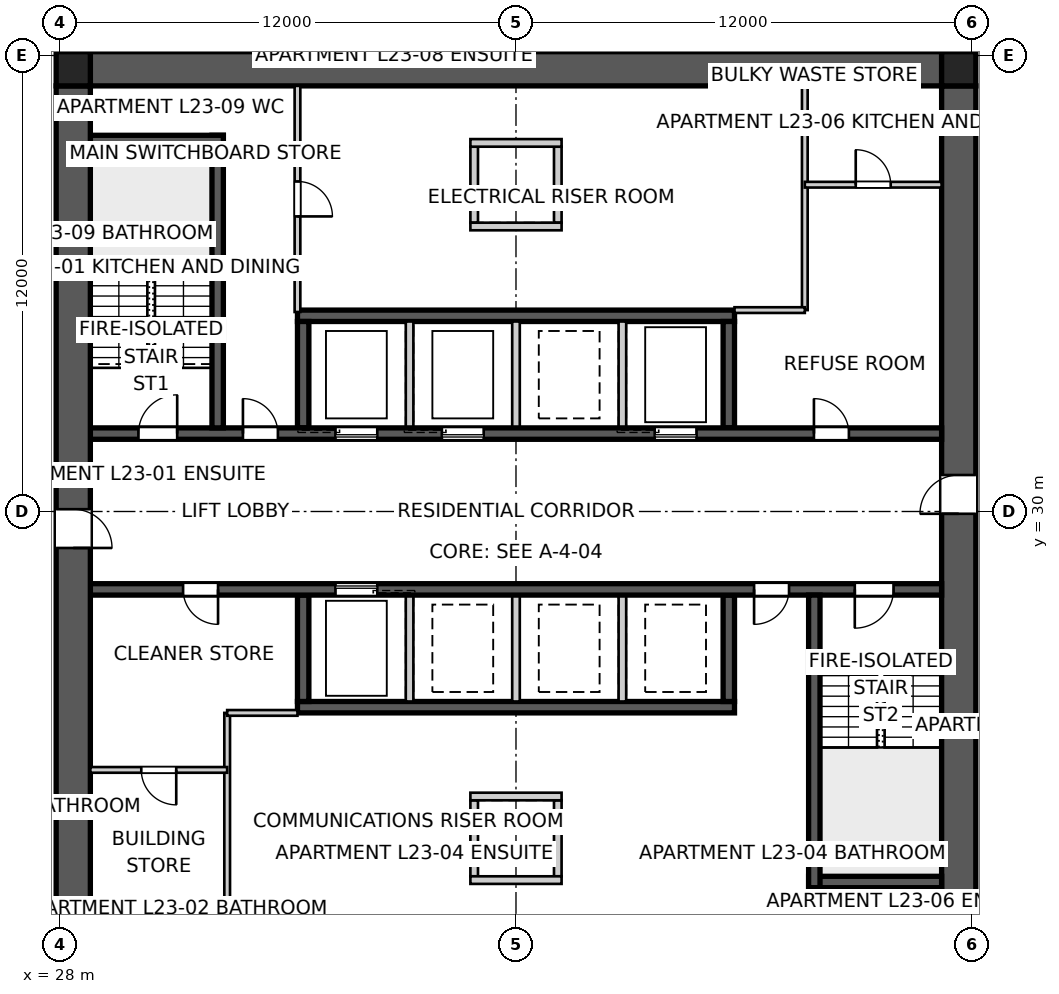
"""IFC4 building model, lengths in metres.
Left out: names, types, materials, properties, quantities, classifications, styles, units other than length and angle.
Written with IfcOpenShell. Run it as: python <this file> out.ifc"""

import sys

from ifc_helpers import new_model, si_unit, direction, frame, frame_2d, origin, origin_2d, place, context, subcontext, project, spatial, polyline, rectangle, outline, extrude, element, fill, save


model = new_model("IFC4")
c1 = context("Model", 3, precision=1e-05, world=origin(), true_north=direction((0.0, 1.0)))
c2 = subcontext(c1, "Body", "Model", "MODEL_VIEW")
j1 = project(units=[si_unit("LENGTHUNIT", "METRE"), si_unit("PLANEANGLEUNIT", "RADIAN")], contexts=[c1])
p1 = place(None, origin())
s1 = spatial("IfcSite", under=j1, at=p1, CompositionType="ELEMENT")
p2 = place(p1, origin())
s2 = spatial("IfcBuilding", under=s1, at=p2, CompositionType="ELEMENT")
p3 = place(p2, frame((0.0, 0.0, 86.2)))
s3 = spatial("IfcBuildingStorey", under=s2, at=p3, CompositionType="ELEMENT", Elevation=86.2)
p4 = place(p3, frame((28.8, 41.65, 0.0), z_axis=(0.0, 0.0, 1.0), x_axis=(1.0, 0.0, 0.0)))
e1 = element("IfcWall", 1, at=p4, inside=s3, PredefinedType="SHEAR", context=c2, shape_type="SweptSolid", body=[
    extrude(outline(polyline([(0.0, -0.45), (22.4, -0.45), (22.4, -0.025), (22.85, -0.025), (22.85, 0.025), (22.4, 0.025), (22.4, 0.45), (0.0, 0.45), (0.0, 0.025), (-0.45, 0.025), (-0.45, -0.025), (0.0, -0.025), (0.0, -0.45)])), origin(), (0.0, 0.0, 1.0), 3.4),
])
p5 = place(p3, frame((51.65, 18.8, 0.0), z_axis=(0.0, 0.0, 1.0), x_axis=(0.0, 1.0, 0.0)))
e2 = element("IfcWall", 2, at=p5, inside=s3, PredefinedType="SHEAR", context=c2, shape_type="SweptSolid", body=[
    extrude(outline(polyline([(0.0, -0.45), (22.4, -0.45), (22.4, -0.025), (22.85, -0.025), (22.85, 0.025), (22.4, 0.025), (22.4, 0.45), (0.0, 0.45), (0.0, 0.025), (-0.45, 0.025), (-0.45, -0.025), (0.0, -0.025), (0.0, -0.45)])), origin(), (0.0, 0.0, 1.0), 3.4),
])
p6 = place(p5, frame((11.14, 0.0, 0.0)))
e3 = element("IfcOpeningElement", 3, at=p6, cuts=e2, PredefinedType="OPENING", context=c2, shape_type="SweptSolid", body=[
    extrude(rectangle(XDim=1.02, YDim=2.4, at=frame_2d((0.51, 1.2))), frame((0.0, 0.46, 0.0), z_axis=(0.0, -1.0, 0.0), x_axis=(1.0, 0.0, 0.0)), (0.0, 0.0, 1.0), 0.92),
])
p7 = place(p3, frame((28.35, 41.2, 0.0), z_axis=(0.0, 0.0, 1.0), x_axis=(0.0, -1.0, 0.0)))
e4 = element("IfcWall", 4, at=p7, inside=s3, PredefinedType="SHEAR", context=c2, shape_type="SweptSolid", body=[
    extrude(outline(polyline([(0.0, -0.45), (22.4, -0.45), (22.4, -0.025), (22.85, -0.025), (22.85, 0.025), (22.4, 0.025), (22.4, 0.45), (0.0, 0.45), (0.0, 0.025), (-0.45, 0.025), (-0.45, -0.025), (0.0, -0.025), (0.0, -0.45)])), origin(), (0.0, 0.0, 1.0), 3.4),
])
p8 = place(p7, frame((11.14, 0.0, 0.0)))
e5 = element("IfcOpeningElement", 5, at=p8, cuts=e4, PredefinedType="OPENING", context=c2, shape_type="SweptSolid", body=[
    extrude(rectangle(XDim=1.02, YDim=2.4, at=frame_2d((0.51, 1.2))), frame((0.0, 0.46, 0.0), z_axis=(0.0, -1.0, 0.0), x_axis=(1.0, 0.0, 0.0)), (0.0, 0.0, 1.0), 0.92),
])
p9 = place(p3, frame((28.8, 32.05, 0.0), z_axis=(0.0, 0.0, 1.0), x_axis=(1.0, 0.0, 0.0)))
e6 = element("IfcWall", 6, at=p9, inside=s3, PredefinedType="SHEAR", context=c2, shape_type="SweptSolid", body=[
    extrude(rectangle(XDim=22.4, YDim=0.3, at=frame_2d((11.2, 0.0))), origin(), (0.0, 0.0, 1.0), 3.4),
])
p10 = place(p9, frame((19.04, 0.0, 0.0)))
e7 = element("IfcOpeningElement", 7, at=p10, cuts=e6, PredefinedType="OPENING", context=c2, shape_type="SweptSolid", body=[
    extrude(rectangle(XDim=0.92, YDim=2.1, at=frame_2d((0.46, 1.05))), frame((0.0, 0.16, 0.0), z_axis=(0.0, -1.0, 0.0), x_axis=(1.0, 0.0, 0.0)), (0.0, 0.0, 1.0), 0.32),
])
p11 = place(p9, frame((1.265, 0.0, 0.0)))
e8 = element("IfcOpeningElement", 8, at=p11, cuts=e6, PredefinedType="OPENING", context=c2, shape_type="SweptSolid", body=[
    extrude(rectangle(XDim=1.02, YDim=2.1, at=frame_2d((0.51, 1.05))), frame((0.0, 0.16, 0.0), z_axis=(0.0, -1.0, 0.0), x_axis=(1.0, 0.0, 0.0)), (0.0, 0.0, 1.0), 0.32),
])
p12 = place(p9, frame((4.015, 0.0, 0.0)))
e9 = element("IfcOpeningElement", 9, at=p12, cuts=e6, PredefinedType="OPENING", context=c2, shape_type="SweptSolid", body=[
    extrude(rectangle(XDim=0.92, YDim=2.1, at=frame_2d((0.46, 1.05))), frame((0.0, 0.16, 0.0), z_axis=(0.0, -1.0, 0.0), x_axis=(1.0, 0.0, 0.0)), (0.0, 0.0, 1.0), 0.32),
])
p13 = place(p9, frame((6.45, 0.0, 0.0)))
e10 = element("IfcOpeningElement", 10, at=p13, cuts=e6, PredefinedType="OPENING", context=c2, shape_type="SweptSolid", body=[
    extrude(rectangle(XDim=1.1, YDim=2.1, at=frame_2d((0.55, 1.05))), frame((0.0, 0.16, 0.0), z_axis=(0.0, -1.0, 0.0), x_axis=(1.0, 0.0, 0.0)), (0.0, 0.0, 1.0), 0.32),
])
p14 = place(p9, frame((9.25, 0.0, 0.0)))
e11 = element("IfcOpeningElement", 11, at=p14, cuts=e6, PredefinedType="OPENING", context=c2, shape_type="SweptSolid", body=[
    extrude(rectangle(XDim=1.1, YDim=2.1, at=frame_2d((0.55, 1.05))), frame((0.0, 0.16, 0.0), z_axis=(0.0, -1.0, 0.0), x_axis=(1.0, 0.0, 0.0)), (0.0, 0.0, 1.0), 0.32),
])
p15 = place(p9, frame((14.85, 0.0, 0.0)))
e12 = element("IfcOpeningElement", 12, at=p15, cuts=e6, PredefinedType="OPENING", context=c2, shape_type="SweptSolid", body=[
    extrude(rectangle(XDim=1.1, YDim=2.1, at=frame_2d((0.55, 1.05))), frame((0.0, 0.16, 0.0), z_axis=(0.0, -1.0, 0.0), x_axis=(1.0, 0.0, 0.0)), (0.0, 0.0, 1.0), 0.32),
])
p16 = place(p3, frame((51.2, 27.95, 0.0), z_axis=(0.0, 0.0, 1.0), x_axis=(-1.0, 0.0, 0.0)))
e13 = element("IfcWall", 13, at=p16, inside=s3, PredefinedType="SHEAR", context=c2, shape_type="SweptSolid", body=[
    extrude(rectangle(XDim=22.4, YDim=0.3, at=frame_2d((11.2, 0.0))), origin(), (0.0, 0.0, 1.0), 3.4),
])
p17 = place(p16, frame((19.04, 0.0, 0.0)))
e14 = element("IfcOpeningElement", 14, at=p17, cuts=e13, PredefinedType="OPENING", context=c2, shape_type="SweptSolid", body=[
    extrude(rectangle(XDim=0.92, YDim=2.1, at=frame_2d((0.46, 1.05))), frame((0.0, 0.16, 0.0), z_axis=(0.0, -1.0, 0.0), x_axis=(1.0, 0.0, 0.0)), (0.0, 0.0, 1.0), 0.32),
])
p18 = place(p16, frame((1.265, 0.0, 0.0)))
e15 = element("IfcOpeningElement", 15, at=p18, cuts=e13, PredefinedType="OPENING", context=c2, shape_type="SweptSolid", body=[
    extrude(rectangle(XDim=1.02, YDim=2.1, at=frame_2d((0.51, 1.05))), frame((0.0, 0.16, 0.0), z_axis=(0.0, -1.0, 0.0), x_axis=(1.0, 0.0, 0.0)), (0.0, 0.0, 1.0), 0.32),
])
p19 = place(p16, frame((4.015, 0.0, 0.0)))
e16 = element("IfcOpeningElement", 16, at=p19, cuts=e13, PredefinedType="OPENING", context=c2, shape_type="SweptSolid", body=[
    extrude(rectangle(XDim=0.92, YDim=2.1, at=frame_2d((0.46, 1.05))), frame((0.0, 0.16, 0.0), z_axis=(0.0, -1.0, 0.0), x_axis=(1.0, 0.0, 0.0)), (0.0, 0.0, 1.0), 0.32),
])
p20 = place(p16, frame((14.85, 0.0, 0.0)))
e17 = element("IfcOpeningElement", 17, at=p20, cuts=e13, PredefinedType="OPENING", context=c2, shape_type="SweptSolid", body=[
    extrude(rectangle(XDim=1.1, YDim=2.1, at=frame_2d((0.55, 1.05))), frame((0.0, 0.16, 0.0), z_axis=(0.0, -1.0, 0.0), x_axis=(1.0, 0.0, 0.0)), (0.0, 0.0, 1.0), 0.32),
])
for number, where, z_axis, x_axis in (
    (18, (34.25, 35.15, 0.0), (0.0, 0.0, 1.0), (1.0, 0.0, 0.0)),
    (19, (45.75, 24.85, 0.0), (0.0, 0.0, 1.0), (-1.0, 0.0, 0.0)),
):
    element("IfcWall", number, at=place(p3, frame(where, z_axis=z_axis, x_axis=x_axis)), inside=s3, PredefinedType="SHEAR", context=c2, shape_type="SweptSolid", body=[
        extrude(rectangle(XDim=11.5, YDim=0.3, at=frame_2d((5.75, 0.0))), origin(), (0.0, 0.0, 1.0), 3.4),
    ])
for number, where, z_axis, x_axis in (
    (20, (34.4, 32.2, 0.0), (0.0, 0.0, 1.0), (0.0, 1.0, 0.0)),
    (21, (45.6, 27.8, 0.0), (0.0, 0.0, 1.0), (0.0, -1.0, 0.0)),
):
    element("IfcWall", number, at=place(p3, frame(where, z_axis=z_axis, x_axis=x_axis)), inside=s3, PredefinedType="SHEAR", context=c2, shape_type="SweptSolid", body=[
        extrude(rectangle(XDim=2.8, YDim=0.3, at=frame_2d((1.4, 0.0))), origin(), (0.0, 0.0, 1.0), 3.4),
    ])
for number, where, z_axis, x_axis in (
    (22, (37.2, 32.2, 0.0), (0.0, 0.0, 1.0), (0.0, 1.0, 0.0)),
    (23, (42.8, 27.8, 0.0), (0.0, 0.0, 1.0), (0.0, -1.0, 0.0)),
    (24, (40.0, 32.2, 0.0), (0.0, 0.0, 1.0), (0.0, 1.0, 0.0)),
    (25, (40.0, 27.8, 0.0), (0.0, 0.0, 1.0), (0.0, -1.0, 0.0)),
    (26, (42.8, 32.2, 0.0), (0.0, 0.0, 1.0), (0.0, 1.0, 0.0)),
    (27, (37.2, 27.8, 0.0), (0.0, 0.0, 1.0), (0.0, -1.0, 0.0)),
):
    element("IfcWall", number, at=place(p3, frame(where, z_axis=z_axis, x_axis=x_axis)), inside=s3, PredefinedType="SOLIDWALL", context=c2, shape_type="SweptSolid", body=[
        extrude(rectangle(XDim=2.8, YDim=0.2, at=frame_2d((1.4, 0.0))), origin(), (0.0, 0.0, 1.0), 3.4),
    ])
for number, where, z_axis, x_axis in (
    (28, (45.6, 32.2, 0.0), (0.0, 0.0, 1.0), (0.0, 1.0, 0.0)),
    (29, (34.4, 27.8, 0.0), (0.0, 0.0, 1.0), (0.0, -1.0, 0.0)),
):
    element("IfcWall", number, at=place(p3, frame(where, z_axis=z_axis, x_axis=x_axis)), inside=s3, PredefinedType="SHEAR", context=c2, shape_type="SweptSolid", body=[
        extrude(rectangle(XDim=2.8, YDim=0.3, at=frame_2d((1.4, 0.0))), origin(), (0.0, 0.0, 1.0), 3.4),
    ])
p21 = place(p3, frame((32.15, 32.2, 0.0), z_axis=(0.0, 0.0, 1.0), x_axis=(0.0, 1.0, 0.0)))
e30 = element("IfcWall", 30, at=p21, inside=s3, PredefinedType="SHEAR", context=c2, shape_type="SweptSolid", body=[
    extrude(rectangle(XDim=7.7, YDim=0.3, at=frame_2d((3.85, 0.0))), origin(), (0.0, 0.0, 1.0), 3.4),
])
p22 = place(p3, frame((28.8, 39.75, 0.0), z_axis=(0.0, 0.0, 1.0), x_axis=(1.0, 0.0, 0.0)))
e31 = element("IfcWall", 31, at=p22, inside=s3, PredefinedType="SHEAR", context=c2, shape_type="SweptSolid", body=[
    extrude(rectangle(XDim=3.5, YDim=0.3, at=frame_2d((1.75, 0.0))), origin(), (0.0, 0.0, 1.0), 3.4),
])
p23 = place(p3, frame((47.85, 27.8, 0.0), z_axis=(0.0, 0.0, 1.0), x_axis=(0.0, -1.0, 0.0)))
e32 = element("IfcWall", 32, at=p23, inside=s3, PredefinedType="SHEAR", context=c2, shape_type="SweptSolid", body=[
    extrude(rectangle(XDim=7.7, YDim=0.3, at=frame_2d((3.85, 0.0))), origin(), (0.0, 0.0, 1.0), 3.4),
])
p24 = place(p3, frame((51.2, 20.25, 0.0), z_axis=(0.0, 0.0, 1.0), x_axis=(-1.0, 0.0, 0.0)))
e33 = element("IfcWall", 33, at=p24, inside=s3, PredefinedType="SHEAR", context=c2, shape_type="SweptSolid", body=[
    extrude(rectangle(XDim=3.5, YDim=0.3, at=frame_2d((1.75, 0.0))), origin(), (0.0, 0.0, 1.0), 3.4),
])
for number, where, z_axis, x_axis in (
    (34, (38.9, 37.6, 0.0), (0.0, 0.0, 1.0), (0.0, 1.0, 0.0)),
    (35, (41.1, 37.6, 0.0), (0.0, 0.0, 1.0), (0.0, 1.0, 0.0)),
):
    element("IfcWall", number, at=place(p3, frame(where, z_axis=z_axis, x_axis=x_axis)), inside=s3, PredefinedType="SOLIDWALL", context=c2, shape_type="SweptSolid", body=[
        extrude(rectangle(XDim=2.0, YDim=0.2, at=frame_2d((1.0, 0.0))), origin(), (0.0, 0.0, 1.0), 3.4),
    ])
for number, where, z_axis, x_axis in (
    (36, (38.8, 37.5, 0.0), (0.0, 0.0, 1.0), (1.0, 0.0, 0.0)),
    (37, (38.8, 39.7, 0.0), (0.0, 0.0, 1.0), (1.0, 0.0, 0.0)),
):
    element("IfcWall", number, at=place(p3, frame(where, z_axis=z_axis, x_axis=x_axis)), inside=s3, PredefinedType="SOLIDWALL", context=c2, shape_type="SweptSolid", body=[
        extrude(rectangle(XDim=2.4, YDim=0.2, at=frame_2d((1.2, 0.0))), origin(), (0.0, 0.0, 1.0), 3.4),
    ])
for number, where, z_axis, x_axis in (
    (38, (38.9, 22.4, 0.0), (0.0, 0.0, 1.0), (0.0, -1.0, 0.0)),
    (39, (41.1, 22.4, 0.0), (0.0, 0.0, 1.0), (0.0, -1.0, 0.0)),
):
    element("IfcWall", number, at=place(p3, frame(where, z_axis=z_axis, x_axis=x_axis)), inside=s3, PredefinedType="SOLIDWALL", context=c2, shape_type="SweptSolid", body=[
        extrude(rectangle(XDim=2.0, YDim=0.2, at=frame_2d((1.0, 0.0))), origin(), (0.0, 0.0, 1.0), 3.4),
    ])
for number, where, z_axis, x_axis in (
    (40, (38.8, 22.5, 0.0), (0.0, 0.0, 1.0), (1.0, 0.0, 0.0)),
    (41, (38.8, 20.3, 0.0), (0.0, 0.0, 1.0), (1.0, 0.0, 0.0)),
):
    element("IfcWall", number, at=place(p3, frame(where, z_axis=z_axis, x_axis=x_axis)), inside=s3, PredefinedType="SOLIDWALL", context=c2, shape_type="SweptSolid", body=[
        extrude(rectangle(XDim=2.4, YDim=0.2, at=frame_2d((1.2, 0.0))), origin(), (0.0, 0.0, 1.0), 3.4),
    ])
for number, where, z_axis, x_axis in (
    (42, (51.65, 41.65, 0.0), (0.0, 0.0, 1.0), (1.0, 0.0, 0.0)),
    (43, (28.35, 41.65, 0.0), (0.0, 0.0, 1.0), (1.0, 0.0, 0.0)),
):
    element("IfcColumn", number, at=place(p3, frame(where, z_axis=z_axis, x_axis=x_axis)), inside=s3, PredefinedType="COLUMN", context=c2, shape_type="SweptSolid", body=[
        extrude(rectangle(XDim=0.9, YDim=0.9, at=origin_2d()), origin(), (0.0, 0.0, 1.0), 3.4),
    ])
p25 = place(p3, frame((34.25, 41.2, 0.0), z_axis=(0.0, 0.0, 1.0), x_axis=(0.0, -1.0, 0.0)))
e44 = element("IfcWall", 44, at=p25, inside=s3, PredefinedType="SOLIDWALL", context=c2, shape_type="SweptSolid", body=[
    extrude(rectangle(XDim=5.95, YDim=0.15, at=frame_2d((2.975, 0.0))), origin(), (0.0, 0.0, 1.0), 3.25),
])
p26 = place(p25, frame((2.515, 0.0, 0.0)))
e45 = element("IfcOpeningElement", 45, at=p26, cuts=e44, PredefinedType="OPENING", context=c2, shape_type="SweptSolid", body=[
    extrude(rectangle(XDim=0.92, YDim=2.1, at=frame_2d((0.46, 1.05))), frame((0.0, 0.085, 0.0), z_axis=(0.0, -1.0, 0.0), x_axis=(1.0, 0.0, 0.0)), (0.0, 0.0, 1.0), 0.17),
])
p27 = place(p3, frame((47.6, 41.2, 0.0), z_axis=(0.0, 0.0, 1.0), x_axis=(0.0, -1.0, 0.0)))
e46 = element("IfcWall", 46, at=p27, inside=s3, PredefinedType="SOLIDWALL", context=c2, shape_type="SweptSolid", body=[
    extrude(rectangle(XDim=5.9, YDim=0.15, at=frame_2d((2.95, 0.0))), origin(), (0.0, 0.0, 1.0), 3.25),
])
p28 = place(p3, frame((47.6, 35.3, 0.0), z_axis=(0.0, 0.0, 1.0), x_axis=(-1.0, 0.0, 0.0)))
e47 = element("IfcWall", 47, at=p28, inside=s3, PredefinedType="SOLIDWALL", context=c2, shape_type="SweptSolid", body=[
    extrude(rectangle(XDim=1.85, YDim=0.15, at=frame_2d((0.925, 0.0))), origin(), (0.0, 0.0, 1.0), 3.25),
])
p29 = place(p3, frame((47.6, 38.6, 0.0), z_axis=(0.0, 0.0, 1.0), x_axis=(1.0, 0.0, 0.0)))
e48 = element("IfcWall", 48, at=p29, inside=s3, PredefinedType="SOLIDWALL", context=c2, shape_type="SweptSolid", body=[
    extrude(rectangle(XDim=3.6, YDim=0.15, at=frame_2d((1.8, 0.0))), origin(), (0.0, 0.0, 1.0), 3.25),
])
p30 = place(p29, frame((1.34, 0.0, 0.0)))
e49 = element("IfcOpeningElement", 49, at=p30, cuts=e48, PredefinedType="OPENING", context=c2, shape_type="SweptSolid", body=[
    extrude(rectangle(XDim=0.92, YDim=2.1, at=frame_2d((0.46, 1.05))), frame((0.0, 0.085, 0.0), z_axis=(0.0, -1.0, 0.0), x_axis=(1.0, 0.0, 0.0)), (0.0, 0.0, 1.0), 0.17),
])
p31 = place(p3, frame((32.4, 18.8, 0.0), z_axis=(0.0, 0.0, 1.0), x_axis=(0.0, 1.0, 0.0)))
e50 = element("IfcWall", 50, at=p31, inside=s3, PredefinedType="SOLIDWALL", context=c2, shape_type="SweptSolid", body=[
    extrude(rectangle(XDim=5.9, YDim=0.15, at=frame_2d((2.95, 0.0))), origin(), (0.0, 0.0, 1.0), 3.25),
])
p32 = place(p3, frame((32.4, 24.7, 0.0), z_axis=(0.0, 0.0, 1.0), x_axis=(1.0, 0.0, 0.0)))
e51 = element("IfcWall", 51, at=p32, inside=s3, PredefinedType="SOLIDWALL", context=c2, shape_type="SweptSolid", body=[
    extrude(rectangle(XDim=1.85, YDim=0.15, at=frame_2d((0.925, 0.0))), origin(), (0.0, 0.0, 1.0), 3.25),
])
p33 = place(p3, frame((32.4, 23.2, 0.0), z_axis=(0.0, 0.0, 1.0), x_axis=(-1.0, 0.0, 0.0)))
e52 = element("IfcWall", 52, at=p33, inside=s3, PredefinedType="SOLIDWALL", context=c2, shape_type="SweptSolid", body=[
    extrude(rectangle(XDim=3.6, YDim=0.15, at=frame_2d((1.8, 0.0))), origin(), (0.0, 0.0, 1.0), 3.25),
])
p34 = place(p33, frame((1.34, 0.0, 0.0)))
e53 = element("IfcOpeningElement", 53, at=p34, cuts=e52, PredefinedType="OPENING", context=c2, shape_type="SweptSolid", body=[
    extrude(rectangle(XDim=0.92, YDim=2.1, at=frame_2d((0.46, 1.05))), frame((0.0, 0.085, 0.0), z_axis=(0.0, -1.0, 0.0), x_axis=(1.0, 0.0, 0.0)), (0.0, 0.0, 1.0), 0.17),
])
p35 = place(p10, origin())
e54 = element("IfcDoor", 54, at=p35, inside=s3, OperationType="SINGLE_SWING_LEFT", PredefinedType="DOOR", context=c2, shape_type="SweptSolid", body=[
    extrude(rectangle(XDim=0.92, YDim=2.1, at=frame_2d((0.46, 1.05))), frame((0.0, 0.025, 0.0), z_axis=(0.0, -1.0, 0.0), x_axis=(1.0, 0.0, 0.0)), (0.0, 0.0, 1.0), 0.05),
])
fill(e7, e54)
p36 = place(p17, origin())
e55 = element("IfcDoor", 55, at=p36, inside=s3, OperationType="SINGLE_SWING_LEFT", PredefinedType="DOOR", context=c2, shape_type="SweptSolid", body=[
    extrude(rectangle(XDim=0.92, YDim=2.1, at=frame_2d((0.46, 1.05))), frame((0.0, 0.025, 0.0), z_axis=(0.0, -1.0, 0.0), x_axis=(1.0, 0.0, 0.0)), (0.0, 0.0, 1.0), 0.05),
])
fill(e14, e55)
p37 = place(p18, origin())
e56 = element("IfcDoor", 56, at=p37, inside=s3, OperationType="SINGLE_SWING_RIGHT", PredefinedType="DOOR", context=c2, shape_type="SweptSolid", body=[
    extrude(rectangle(XDim=1.02, YDim=2.1, at=frame_2d((0.51, 1.05))), frame((0.0, 0.025, 0.0), z_axis=(0.0, -1.0, 0.0), x_axis=(1.0, 0.0, 0.0)), (0.0, 0.0, 1.0), 0.05),
])
fill(e15, e56)
p38 = place(p11, origin())
e57 = element("IfcDoor", 57, at=p38, inside=s3, OperationType="SINGLE_SWING_RIGHT", PredefinedType="DOOR", context=c2, shape_type="SweptSolid", body=[
    extrude(rectangle(XDim=1.02, YDim=2.1, at=frame_2d((0.51, 1.05))), frame((0.0, 0.025, 0.0), z_axis=(0.0, -1.0, 0.0), x_axis=(1.0, 0.0, 0.0)), (0.0, 0.0, 1.0), 0.05),
])
fill(e8, e57)
p39 = place(p12, origin())
e58 = element("IfcDoor", 58, at=p39, inside=s3, OperationType="SINGLE_SWING_LEFT", PredefinedType="DOOR", context=c2, shape_type="SweptSolid", body=[
    extrude(rectangle(XDim=0.92, YDim=2.1, at=frame_2d((0.46, 1.05))), frame((0.0, 0.025, 0.0), z_axis=(0.0, -1.0, 0.0), x_axis=(1.0, 0.0, 0.0)), (0.0, 0.0, 1.0), 0.05),
])
fill(e9, e58)
p40 = place(p19, origin())
e59 = element("IfcDoor", 59, at=p40, inside=s3, OperationType="SINGLE_SWING_RIGHT", PredefinedType="DOOR", context=c2, shape_type="SweptSolid", body=[
    extrude(rectangle(XDim=0.92, YDim=2.1, at=frame_2d((0.46, 1.05))), frame((0.0, 0.025, 0.0), z_axis=(0.0, -1.0, 0.0), x_axis=(1.0, 0.0, 0.0)), (0.0, 0.0, 1.0), 0.05),
])
fill(e16, e59)
p41 = place(p30, origin())
e60 = element("IfcDoor", 60, at=p41, inside=s3, OperationType="SINGLE_SWING_LEFT", PredefinedType="DOOR", context=c2, shape_type="SweptSolid", body=[
    extrude(rectangle(XDim=0.92, YDim=2.1, at=frame_2d((0.46, 1.05))), frame((0.0, 0.025, 0.0), z_axis=(0.0, -1.0, 0.0), x_axis=(1.0, 0.0, 0.0)), (0.0, 0.0, 1.0), 0.05),
])
fill(e49, e60)
p42 = place(p34, origin())
e61 = element("IfcDoor", 61, at=p42, inside=s3, OperationType="SINGLE_SWING_LEFT", PredefinedType="DOOR", context=c2, shape_type="SweptSolid", body=[
    extrude(rectangle(XDim=0.92, YDim=2.1, at=frame_2d((0.46, 1.05))), frame((0.0, 0.025, 0.0), z_axis=(0.0, -1.0, 0.0), x_axis=(1.0, 0.0, 0.0)), (0.0, 0.0, 1.0), 0.05),
])
fill(e53, e61)
p43 = place(p26, origin())
e62 = element("IfcDoor", 62, at=p43, inside=s3, OperationType="SINGLE_SWING_RIGHT", PredefinedType="DOOR", context=c2, shape_type="SweptSolid", body=[
    extrude(rectangle(XDim=0.92, YDim=2.1, at=frame_2d((0.46, 1.05))), frame((0.0, 0.025, 0.0), z_axis=(0.0, -1.0, 0.0), x_axis=(1.0, 0.0, 0.0)), (0.0, 0.0, 1.0), 0.05),
])
fill(e45, e62)
p44 = place(p6, origin())
e63 = element("IfcDoor", 63, at=p44, inside=s3, OperationType="SINGLE_SWING_LEFT", PredefinedType="DOOR", context=c2, shape_type="SweptSolid", body=[
    extrude(rectangle(XDim=1.02, YDim=2.4, at=frame_2d((0.51, 1.2))), frame((0.0, 0.025, 0.0), z_axis=(0.0, -1.0, 0.0), x_axis=(1.0, 0.0, 0.0)), (0.0, 0.0, 1.0), 0.05),
])
fill(e3, e63)
p45 = place(p8, origin())
e64 = element("IfcDoor", 64, at=p45, inside=s3, OperationType="SINGLE_SWING_RIGHT", PredefinedType="DOOR", context=c2, shape_type="SweptSolid", body=[
    extrude(rectangle(XDim=1.02, YDim=2.4, at=frame_2d((0.51, 1.2))), frame((0.0, 0.025, 0.0), z_axis=(0.0, -1.0, 0.0), x_axis=(1.0, 0.0, 0.0)), (0.0, 0.0, 1.0), 0.05),
])
fill(e5, e64)
p46 = place(p13, origin())
e65 = element("IfcDoor", 65, at=p46, inside=s3, OperationType="SLIDING_TO_LEFT", PredefinedType="DOOR", context=c2, shape_type="SweptSolid", body=[
    extrude(rectangle(XDim=1.1, YDim=2.1, at=frame_2d((0.55, 1.05))), frame((0.0, 0.025, 0.0), z_axis=(0.0, -1.0, 0.0), x_axis=(1.0, 0.0, 0.0)), (0.0, 0.0, 1.0), 0.05),
])
fill(e10, e65)
p47 = place(p14, origin())
e66 = element("IfcDoor", 66, at=p47, inside=s3, OperationType="SLIDING_TO_LEFT", PredefinedType="DOOR", context=c2, shape_type="SweptSolid", body=[
    extrude(rectangle(XDim=1.1, YDim=2.1, at=frame_2d((0.55, 1.05))), frame((0.0, 0.025, 0.0), z_axis=(0.0, -1.0, 0.0), x_axis=(1.0, 0.0, 0.0)), (0.0, 0.0, 1.0), 0.05),
])
fill(e11, e66)
p48 = place(p15, origin())
e67 = element("IfcDoor", 67, at=p48, inside=s3, OperationType="SLIDING_TO_LEFT", PredefinedType="DOOR", context=c2, shape_type="SweptSolid", body=[
    extrude(rectangle(XDim=1.1, YDim=2.1, at=frame_2d((0.55, 1.05))), frame((0.0, 0.025, 0.0), z_axis=(0.0, -1.0, 0.0), x_axis=(1.0, 0.0, 0.0)), (0.0, 0.0, 1.0), 0.05),
])
fill(e12, e67)
p49 = place(p20, origin())
e68 = element("IfcDoor", 68, at=p49, inside=s3, OperationType="SLIDING_TO_LEFT", PredefinedType="DOOR", context=c2, shape_type="SweptSolid", body=[
    extrude(rectangle(XDim=1.1, YDim=2.1, at=frame_2d((0.55, 1.05))), frame((0.0, 0.025, 0.0), z_axis=(0.0, -1.0, 0.0), x_axis=(1.0, 0.0, 0.0)), (0.0, 0.0, 1.0), 0.05),
])
fill(e17, e68)
save(model, sys.argv[1])
